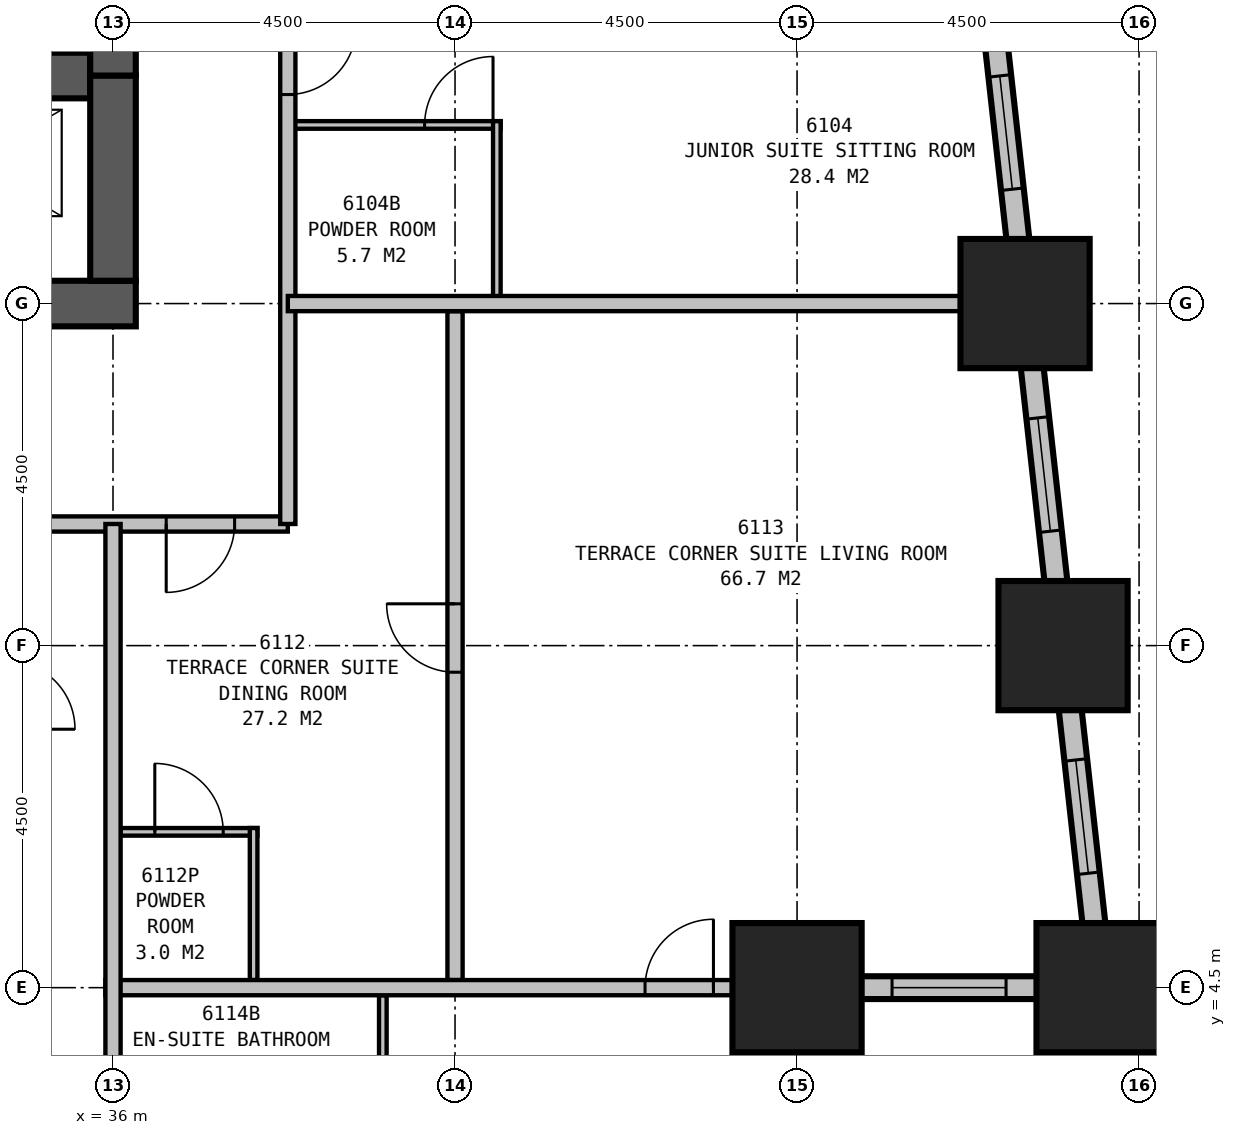
"""IFC4 building model, lengths in metres.
Left out: names, types, materials, properties, quantities, classifications, styles, units other than length and angle.
Written with IfcOpenShell. Run it as: python <this file> out.ifc"""

import sys

from ifc_helpers import new_model, si_unit, direction, frame, frame_2d, origin, origin_2d, place, context, subcontext, project, spatial, rectangle, extrude, element, fill, save


model = new_model("IFC4")
c1 = context("Model", 3, precision=1e-05, world=origin(), true_north=direction((0.0, 1.0)))
c2 = subcontext(c1, "Body", "Model", "MODEL_VIEW")
j1 = project(units=[si_unit("LENGTHUNIT", "METRE"), si_unit("PLANEANGLEUNIT", "RADIAN")], contexts=[c1])
p1 = place(None, origin())
s1 = spatial("IfcSite", under=j1, at=p1, CompositionType="ELEMENT")
p2 = place(p1, origin())
s2 = spatial("IfcBuilding", under=s1, at=p2, CompositionType="ELEMENT")
p3 = place(p2, frame((0.0, 0.0, 236.9)))
s3 = spatial("IfcBuildingStorey", under=s2, at=p3, CompositionType="ELEMENT", Elevation=236.9)
for number, where, z_axis, x_axis in (
    (1, (45.0, 4.5, 0.0), (0.0, 0.0, 1.0), (1.0, 0.0, 0.0)),
    (2, (49.0, 4.5, 0.0), (0.0, 0.0, 1.0), (1.0, 0.0, 0.0)),
    (3, (48.5, 9.0, 0.0), (0.0, 0.0, 1.0), (1.0, 0.0, 0.0)),
    (4, (48.0, 13.5, 0.0), (0.0, 0.0, 1.0), (1.0, 0.0, 0.0)),
):
    element("IfcColumn", number, at=place(p3, frame(where, z_axis=z_axis, x_axis=x_axis)), inside=s3, PredefinedType="COLUMN", context=c2, shape_type="SweptSolid", body=[
        extrude(rectangle(XDim=1.7, YDim=1.7, at=origin_2d()), origin(), (0.0, 0.0, 1.0), 3.9),
    ])
p4 = place(p3, frame((13.2, 13.5, 0.0), z_axis=(0.0, 0.0, 1.0), x_axis=(1.0, 0.0, 0.0)))
e5 = element("IfcWall", 5, at=p4, inside=s3, PredefinedType="SHEAR", context=c2, shape_type="SweptSolid", body=[
    extrude(rectangle(XDim=23.1, YDim=0.6, at=frame_2d((11.55, 0.0))), origin(), (0.0, 0.0, 1.0), 3.9),
])
p5 = place(p3, frame((13.8, 16.5, 0.0), z_axis=(0.0, 0.0, 1.0), x_axis=(1.0, 0.0, 0.0)))
e6 = element("IfcWall", 6, at=p5, inside=s3, PredefinedType="SHEAR", context=c2, shape_type="SweptSolid", body=[
    extrude(rectangle(XDim=21.9, YDim=0.6, at=frame_2d((10.95, 0.0))), origin(), (0.0, 0.0, 1.0), 3.9),
])
p6 = place(p5, frame((5.75, 0.0, 0.0), z_axis=(0.0, 0.0, 1.0), x_axis=(-1.0, 0.0, 0.0)))
e7 = element("IfcOpeningElement", 7, at=p6, cuts=e6, PredefinedType="OPENING", context=c2, shape_type="SweptSolid", body=[
    extrude(rectangle(XDim=1.0, YDim=2.1, at=frame_2d((0.5, 1.05))), frame((0.0, 0.31, 0.0), z_axis=(0.0, -1.0, 0.0), x_axis=(1.0, 0.0, 0.0)), (0.0, 0.0, 1.0), 0.62),
])
p7 = place(p5, frame((10.2, 0.0, 0.0), z_axis=(0.0, 0.0, 1.0), x_axis=(-1.0, 0.0, 0.0)))
e8 = element("IfcOpeningElement", 8, at=p7, cuts=e6, PredefinedType="OPENING", context=c2, shape_type="SweptSolid", body=[
    extrude(rectangle(XDim=1.0, YDim=2.1, at=frame_2d((0.5, 1.05))), frame((0.0, 0.31, 0.0), z_axis=(0.0, -1.0, 0.0), x_axis=(1.0, 0.0, 0.0)), (0.0, 0.0, 1.0), 0.62),
])
p8 = place(p5, frame((12.7, 0.0, 0.0), z_axis=(0.0, 0.0, 1.0), x_axis=(-1.0, 0.0, 0.0)))
e9 = element("IfcOpeningElement", 9, at=p8, cuts=e6, PredefinedType="OPENING", context=c2, shape_type="SweptSolid", body=[
    extrude(rectangle(XDim=1.0, YDim=2.1, at=frame_2d((0.5, 1.05))), frame((0.0, 0.31, 0.0), z_axis=(0.0, -1.0, 0.0), x_axis=(1.0, 0.0, 0.0)), (0.0, 0.0, 1.0), 0.62),
])
p9 = place(p5, frame((17.15, 0.0, 0.0), z_axis=(0.0, 0.0, 1.0), x_axis=(-1.0, 0.0, 0.0)))
e10 = element("IfcOpeningElement", 10, at=p9, cuts=e6, PredefinedType="OPENING", context=c2, shape_type="SweptSolid", body=[
    extrude(rectangle(XDim=1.0, YDim=2.1, at=frame_2d((0.5, 1.05))), frame((0.0, 0.31, 0.0), z_axis=(0.0, -1.0, 0.0), x_axis=(1.0, 0.0, 0.0)), (0.0, 0.0, 1.0), 0.62),
])
p10 = place(p5, frame((0.6, 0.0, 0.0)))
e11 = element("IfcOpeningElement", 11, at=p10, cuts=e6, PredefinedType="OPENING", context=c2, shape_type="SweptSolid", body=[
    extrude(rectangle(XDim=1.2, YDim=2.1, at=frame_2d((0.6, 1.05))), frame((0.0, 0.31, 0.0), z_axis=(0.0, -1.0, 0.0), x_axis=(1.0, 0.0, 0.0)), (0.0, 0.0, 1.0), 0.62),
])
p11 = place(p5, frame((19.6, 0.0, 0.0)))
e12 = element("IfcOpeningElement", 12, at=p11, cuts=e6, PredefinedType="OPENING", context=c2, shape_type="SweptSolid", body=[
    extrude(rectangle(XDim=1.2, YDim=2.1, at=frame_2d((0.6, 1.05))), frame((0.0, 0.31, 0.0), z_axis=(0.0, -1.0, 0.0), x_axis=(1.0, 0.0, 0.0)), (0.0, 0.0, 1.0), 0.62),
])
p12 = place(p3, frame((36.0, 13.8, 0.0), z_axis=(0.0, 0.0, 1.0), x_axis=(0.0, 1.0, 0.0)))
e13 = element("IfcWall", 13, at=p12, inside=s3, PredefinedType="SHEAR", context=c2, shape_type="SweptSolid", body=[
    extrude(rectangle(XDim=2.7, YDim=0.6, at=frame_2d((1.35, 0.0))), origin(), (0.0, 0.0, 1.0), 3.9),
])
p13 = place(p3, frame((36.0, 16.5, 0.0), z_axis=(0.0, 0.0, 1.0), x_axis=(0.0, 1.0, 0.0)))
e14 = element("IfcWall", 14, at=p13, inside=s3, PredefinedType="SHEAR", context=c2, shape_type="SweptSolid", body=[
    extrude(rectangle(XDim=3.5, YDim=0.6, at=frame_2d((1.75, 0.0))), origin(), (0.0, 0.0, 1.0), 3.9),
])
p14 = place(p13, frame((0.65, 0.0, 0.0)))
e15 = element("IfcOpeningElement", 15, at=p14, cuts=e14, PredefinedType="OPENING", context=c2, shape_type="SweptSolid", body=[
    extrude(rectangle(XDim=1.2, YDim=2.1, at=frame_2d((0.6, 1.05))), frame((0.0, 0.31, 0.0), z_axis=(0.0, -1.0, 0.0), x_axis=(1.0, 0.0, 0.0)), (0.0, 0.0, 1.0), 0.62),
])
p15 = place(p3, frame((45.0, -0.15, 0.0), z_axis=(0.0, 0.0, 1.0), x_axis=(0.0, 1.0, 0.0)))
e16 = element("IfcWall", 16, at=p15, inside=s3, PredefinedType="STANDARD", context=c2, shape_type="SweptSolid", body=[
    extrude(rectangle(XDim=4.8, YDim=0.3, at=frame_2d((2.4, 0.0))), origin(), (0.0, 0.0, 1.0), 2.5),
])
p16 = place(p15, frame((1.2, 0.0, 0.5)))
e17 = element("IfcOpeningElement", 17, at=p16, cuts=e16, PredefinedType="OPENING", context=c2, shape_type="SweptSolid", body=[
    extrude(rectangle(XDim=2.4, YDim=1.85, at=frame_2d((1.2, 0.925))), frame((0.0, 0.16, 0.0), z_axis=(0.0, -1.0, 0.0), x_axis=(1.0, 0.0, 0.0)), (0.0, 0.0, 1.0), 0.32),
])
p17 = place(p3, frame((44.85, 4.5, 0.0), z_axis=(0.0, 0.0, 1.0), x_axis=(1.0, 0.0, 0.0)))
e18 = element("IfcWall", 18, at=p17, inside=s3, PredefinedType="STANDARD", context=c2, shape_type="SweptSolid", body=[
    extrude(rectangle(XDim=4.3, YDim=0.3, at=frame_2d((2.15, 0.0))), origin(), (0.0, 0.0, 1.0), 2.5),
])
p18 = place(p17, frame((1.4, 0.0, 0.5)))
e19 = element("IfcOpeningElement", 19, at=p18, cuts=e18, PredefinedType="OPENING", context=c2, shape_type="SweptSolid", body=[
    extrude(rectangle(XDim=1.5, YDim=1.85, at=frame_2d((0.75, 0.925))), frame((0.0, 0.16, 0.0), z_axis=(0.0, -1.0, 0.0), x_axis=(1.0, 0.0, 0.0)), (0.0, 0.0, 1.0), 0.32),
])
p19 = place(p3, frame((49.017, 4.351, 0.0), z_axis=(0.0, 0.0, 1.0), x_axis=(-0.110433201132, 0.993883548555, 0.0)))
e20 = element("IfcWall", 20, at=p19, inside=s3, PredefinedType="STANDARD", context=c2, shape_type="SweptSolid", body=[
    extrude(rectangle(XDim=31.994, YDim=0.3, at=frame_2d((15.997, 0.0))), origin(), (0.0, 0.0, 1.0), 2.5),
])
p20 = place(p19, frame((1.664, 0.0, 0.5)))
e21 = element("IfcOpeningElement", 21, at=p20, cuts=e20, PredefinedType="OPENING", context=c2, shape_type="SweptSolid", body=[
    extrude(rectangle(XDim=1.5, YDim=1.85, at=frame_2d((0.75, 0.925))), frame((0.0, 0.16, 0.0), z_axis=(0.0, -1.0, 0.0), x_axis=(1.0, 0.0, 0.0)), (0.0, 0.0, 1.0), 0.32),
])
p21 = place(p19, frame((6.192, 0.0, 0.5)))
e22 = element("IfcOpeningElement", 22, at=p21, cuts=e20, PredefinedType="OPENING", context=c2, shape_type="SweptSolid", body=[
    extrude(rectangle(XDim=1.5, YDim=1.85, at=frame_2d((0.75, 0.925))), frame((0.0, 0.16, 0.0), z_axis=(0.0, -1.0, 0.0), x_axis=(1.0, 0.0, 0.0)), (0.0, 0.0, 1.0), 0.32),
])
p22 = place(p19, frame((10.719, 0.0, 0.5)))
e23 = element("IfcOpeningElement", 23, at=p22, cuts=e20, PredefinedType="OPENING", context=c2, shape_type="SweptSolid", body=[
    extrude(rectangle(XDim=1.5, YDim=1.85, at=frame_2d((0.75, 0.925))), frame((0.0, 0.16, 0.0), z_axis=(0.0, -1.0, 0.0), x_axis=(1.0, 0.0, 0.0)), (0.0, 0.0, 1.0), 0.32),
])
p23 = place(p19, frame((15.247, 0.0, 0.5)))
e24 = element("IfcOpeningElement", 24, at=p23, cuts=e20, PredefinedType="OPENING", context=c2, shape_type="SweptSolid", body=[
    extrude(rectangle(XDim=1.5, YDim=1.85, at=frame_2d((0.75, 0.925))), frame((0.0, 0.16, 0.0), z_axis=(0.0, -1.0, 0.0), x_axis=(1.0, 0.0, 0.0)), (0.0, 0.0, 1.0), 0.32),
])
p24 = place(p19, frame((19.775, 0.0, 0.5)))
e25 = element("IfcOpeningElement", 25, at=p24, cuts=e20, PredefinedType="OPENING", context=c2, shape_type="SweptSolid", body=[
    extrude(rectangle(XDim=1.5, YDim=1.85, at=frame_2d((0.75, 0.925))), frame((0.0, 0.16, 0.0), z_axis=(0.0, -1.0, 0.0), x_axis=(1.0, 0.0, 0.0)), (0.0, 0.0, 1.0), 0.32),
])
p25 = place(p19, frame((24.302, 0.0, 0.5)))
e26 = element("IfcOpeningElement", 26, at=p25, cuts=e20, PredefinedType="OPENING", context=c2, shape_type="SweptSolid", body=[
    extrude(rectangle(XDim=1.5, YDim=1.85, at=frame_2d((0.75, 0.925))), frame((0.0, 0.16, 0.0), z_axis=(0.0, -1.0, 0.0), x_axis=(1.0, 0.0, 0.0)), (0.0, 0.0, 1.0), 0.32),
])
p26 = place(p19, frame((28.83, 0.0, 0.5)))
e27 = element("IfcOpeningElement", 27, at=p26, cuts=e20, PredefinedType="OPENING", context=c2, shape_type="SweptSolid", body=[
    extrude(rectangle(XDim=1.5, YDim=1.85, at=frame_2d((0.75, 0.925))), frame((0.0, 0.16, 0.0), z_axis=(0.0, -1.0, 0.0), x_axis=(1.0, 0.0, 0.0)), (0.0, 0.0, 1.0), 0.32),
])
p27 = place(p3, frame((26.9, 10.6, 0.0), z_axis=(0.0, 0.0, 1.0), x_axis=(1.0, 0.0, 0.0)))
e28 = element("IfcWall", 28, at=p27, inside=s3, PredefinedType="PARTITIONING", context=c2, shape_type="SweptSolid", body=[
    extrude(rectangle(XDim=11.4, YDim=0.2, at=frame_2d((5.7, 0.0))), origin(), (0.0, 0.0, 1.0), 3.65),
])
p28 = place(p27, frame((1.85, 0.0, 0.0), z_axis=(0.0, 0.0, 1.0), x_axis=(-1.0, 0.0, 0.0)))
e29 = element("IfcOpeningElement", 29, at=p28, cuts=e28, PredefinedType="OPENING", context=c2, shape_type="SweptSolid", body=[
    extrude(rectangle(XDim=0.9, YDim=2.1, at=frame_2d((0.45, 1.05))), frame((0.0, 0.11, 0.0), z_axis=(0.0, -1.0, 0.0), x_axis=(1.0, 0.0, 0.0)), (0.0, 0.0, 1.0), 0.22),
])
p29 = place(p27, frame((10.7, 0.0, 0.0), z_axis=(0.0, 0.0, 1.0), x_axis=(-1.0, 0.0, 0.0)))
e30 = element("IfcOpeningElement", 30, at=p29, cuts=e28, PredefinedType="OPENING", context=c2, shape_type="SweptSolid", body=[
    extrude(rectangle(XDim=0.9, YDim=2.1, at=frame_2d((0.45, 1.05))), frame((0.0, 0.11, 0.0), z_axis=(0.0, -1.0, 0.0), x_axis=(1.0, 0.0, 0.0)), (0.0, 0.0, 1.0), 0.22),
])
p30 = place(p3, frame((38.3, 10.6, 0.0), z_axis=(0.0, 0.0, 1.0), x_axis=(0.0, 1.0, 0.0)))
e31 = element("IfcWall", 31, at=p30, inside=s3, PredefinedType="PARTITIONING", context=c2, shape_type="SweptSolid", body=[
    extrude(rectangle(XDim=18.7, YDim=0.2, at=frame_2d((9.35, 0.0))), origin(), (0.0, 0.0, 1.0), 3.65),
])
p31 = place(p30, frame((6.55, 0.0, 0.0), z_axis=(0.0, 0.0, 1.0), x_axis=(-1.0, 0.0, 0.0)))
e32 = element("IfcOpeningElement", 32, at=p31, cuts=e31, PredefinedType="OPENING", context=c2, shape_type="SweptSolid", body=[
    extrude(rectangle(XDim=0.9, YDim=2.1, at=frame_2d((0.45, 1.05))), frame((0.0, 0.11, 0.0), z_axis=(0.0, -1.0, 0.0), x_axis=(1.0, 0.0, 0.0)), (0.0, 0.0, 1.0), 0.22),
])
p32 = place(p30, frame((16.1, 0.0, 0.0), z_axis=(0.0, 0.0, 1.0), x_axis=(-1.0, 0.0, 0.0)))
e33 = element("IfcOpeningElement", 33, at=p32, cuts=e31, PredefinedType="OPENING", context=c2, shape_type="SweptSolid", body=[
    extrude(rectangle(XDim=1.0, YDim=2.1, at=frame_2d((0.5, 1.05))), frame((0.0, 0.11, 0.0), z_axis=(0.0, -1.0, 0.0), x_axis=(1.0, 0.0, 0.0)), (0.0, 0.0, 1.0), 0.22),
])
p33 = place(p3, frame((41.05, 13.5, 0.0), z_axis=(0.0, 0.0, 1.0), x_axis=(0.0, 1.0, 0.0)))
e34 = element("IfcWall", 34, at=p33, inside=s3, PredefinedType="PLUMBINGWALL", context=c2, shape_type="SweptSolid", body=[
    extrude(rectangle(XDim=2.4, YDim=0.1, at=frame_2d((1.2, 0.0))), origin(), (0.0, 0.0, 1.0), 3.65),
])
p34 = place(p3, frame((38.3, 15.85, 0.0), z_axis=(0.0, 0.0, 1.0), x_axis=(1.0, 0.0, 0.0)))
e35 = element("IfcWall", 35, at=p34, inside=s3, PredefinedType="PLUMBINGWALL", context=c2, shape_type="SweptSolid", body=[
    extrude(rectangle(XDim=2.8, YDim=0.1, at=frame_2d((1.4, 0.0))), origin(), (0.0, 0.0, 1.0), 3.65),
])
p35 = place(p34, frame((1.8, 0.0, 0.0)))
e36 = element("IfcOpeningElement", 36, at=p35, cuts=e35, PredefinedType="OPENING", context=c2, shape_type="SweptSolid", body=[
    extrude(rectangle(XDim=0.9, YDim=2.1, at=frame_2d((0.45, 1.05))), frame((0.0, 0.06, 0.0), z_axis=(0.0, -1.0, 0.0), x_axis=(1.0, 0.0, 0.0)), (0.0, 0.0, 1.0), 0.12),
])
p36 = place(p3, frame((38.3, 13.5, 0.0), z_axis=(0.0, 0.0, 1.0), x_axis=(1.0, 0.0, 0.0)))
e37 = element("IfcWall", 37, at=p36, inside=s3, PredefinedType="PARTITIONING", context=c2, shape_type="SweptSolid", body=[
    extrude(rectangle(XDim=9.921, YDim=0.2, at=frame_2d((4.96, 0.0))), origin(), (0.0, 0.0, 1.0), 2.35),
])
p37 = place(p3, frame((36.0, 10.6, 0.0), z_axis=(0.0, 0.0, 1.0), x_axis=(0.0, -1.0, 0.0)))
e38 = element("IfcWall", 38, at=p37, inside=s3, PredefinedType="PARTITIONING", context=c2, shape_type="SweptSolid", body=[
    extrude(rectangle(XDim=10.6, YDim=0.2, at=frame_2d((5.3, 0.0))), origin(), (0.0, 0.0, 1.0), 2.65),
])
p38 = place(p3, frame((35.9, 4.5, 0.0), z_axis=(0.0, 0.0, 1.0), x_axis=(1.0, 0.0, 0.0)))
e39 = element("IfcWall", 39, at=p38, inside=s3, PredefinedType="PARTITIONING", context=c2, shape_type="SweptSolid", body=[
    extrude(rectangle(XDim=9.1, YDim=0.2, at=frame_2d((4.55, 0.0))), origin(), (0.0, 0.0, 1.0), 3.65),
])
p39 = place(p38, frame((7.1, 0.0, 0.0)))
e40 = element("IfcOpeningElement", 40, at=p39, cuts=e39, PredefinedType="OPENING", context=c2, shape_type="SweptSolid", body=[
    extrude(rectangle(XDim=0.9, YDim=2.1, at=frame_2d((0.45, 1.05))), frame((0.0, 0.11, 0.0), z_axis=(0.0, -1.0, 0.0), x_axis=(1.0, 0.0, 0.0)), (0.0, 0.0, 1.0), 0.22),
])
p40 = place(p3, frame((40.5, 4.6, 0.0), z_axis=(0.0, 0.0, 1.0), x_axis=(0.0, 1.0, 0.0)))
e41 = element("IfcWall", 41, at=p40, inside=s3, PredefinedType="PARTITIONING", context=c2, shape_type="SweptSolid", body=[
    extrude(rectangle(XDim=8.8, YDim=0.2, at=frame_2d((4.4, 0.0))), origin(), (0.0, 0.0, 1.0), 2.65),
])
p41 = place(p40, frame((4.05, 0.0, 0.0)))
e42 = element("IfcOpeningElement", 42, at=p41, cuts=e41, PredefinedType="OPENING", context=c2, shape_type="SweptSolid", body=[
    extrude(rectangle(XDim=0.9, YDim=2.1, at=frame_2d((0.45, 1.05))), frame((0.0, 0.11, 0.0), z_axis=(0.0, -1.0, 0.0), x_axis=(1.0, 0.0, 0.0)), (0.0, 0.0, 1.0), 0.22),
])
p42 = place(p3, frame((37.85, 4.6, 0.0), z_axis=(0.0, 0.0, 1.0), x_axis=(0.0, 1.0, 0.0)))
e43 = element("IfcWall", 43, at=p42, inside=s3, PredefinedType="PLUMBINGWALL", context=c2, shape_type="SweptSolid", body=[
    extrude(rectangle(XDim=2.0, YDim=0.1, at=frame_2d((1.0, 0.0))), origin(), (0.0, 0.0, 1.0), 3.65),
])
p43 = place(p3, frame((36.1, 6.55, 0.0), z_axis=(0.0, 0.0, 1.0), x_axis=(1.0, 0.0, 0.0)))
e44 = element("IfcWall", 44, at=p43, inside=s3, PredefinedType="PLUMBINGWALL", context=c2, shape_type="SweptSolid", body=[
    extrude(rectangle(XDim=1.8, YDim=0.1, at=frame_2d((0.9, 0.0))), origin(), (0.0, 0.0, 1.0), 3.65),
])
p44 = place(p43, frame((0.45, 0.0, 0.0)))
e45 = element("IfcOpeningElement", 45, at=p44, cuts=e44, PredefinedType="OPENING", context=c2, shape_type="SweptSolid", body=[
    extrude(rectangle(XDim=0.9, YDim=2.1, at=frame_2d((0.45, 1.05))), frame((0.0, 0.06, 0.0), z_axis=(0.0, -1.0, 0.0), x_axis=(1.0, 0.0, 0.0)), (0.0, 0.0, 1.0), 0.12),
])
p45 = place(p3, frame((39.55, 4.4, 0.0), z_axis=(0.0, 0.0, 1.0), x_axis=(0.0, -1.0, 0.0)))
e46 = element("IfcWall", 46, at=p45, inside=s3, PredefinedType="PLUMBINGWALL", context=c2, shape_type="SweptSolid", body=[
    extrude(rectangle(XDim=2.3, YDim=0.1, at=frame_2d((1.15, 0.0))), origin(), (0.0, 0.0, 1.0), 3.65),
])
p46 = place(p18, origin())
e47 = element("IfcWindow", 47, at=p46, inside=s3, PartitioningType="SINGLE_PANEL", PredefinedType="WINDOW", context=c2, shape_type="SweptSolid", body=[
    extrude(rectangle(XDim=1.5, YDim=1.85, at=frame_2d((0.75, 0.925))), frame((0.0, 0.03, 0.0), z_axis=(0.0, -1.0, 0.0), x_axis=(1.0, 0.0, 0.0)), (0.0, 0.0, 1.0), 0.06),
])
fill(e19, e47)
p47 = place(p20, origin())
e48 = element("IfcWindow", 48, at=p47, inside=s3, PartitioningType="SINGLE_PANEL", PredefinedType="WINDOW", context=c2, shape_type="SweptSolid", body=[
    extrude(rectangle(XDim=1.5, YDim=1.85, at=frame_2d((0.75, 0.925))), frame((0.0, 0.03, 0.0), z_axis=(0.0, -1.0, 0.0), x_axis=(1.0, 0.0, 0.0)), (0.0, 0.0, 1.0), 0.06),
])
fill(e21, e48)
p48 = place(p21, origin())
e49 = element("IfcWindow", 49, at=p48, inside=s3, PartitioningType="SINGLE_PANEL", PredefinedType="WINDOW", context=c2, shape_type="SweptSolid", body=[
    extrude(rectangle(XDim=1.5, YDim=1.85, at=frame_2d((0.75, 0.925))), frame((0.0, 0.03, 0.0), z_axis=(0.0, -1.0, 0.0), x_axis=(1.0, 0.0, 0.0)), (0.0, 0.0, 1.0), 0.06),
])
fill(e22, e49)
p49 = place(p22, origin())
e50 = element("IfcWindow", 50, at=p49, inside=s3, PartitioningType="SINGLE_PANEL", PredefinedType="WINDOW", context=c2, shape_type="SweptSolid", body=[
    extrude(rectangle(XDim=1.5, YDim=1.85, at=frame_2d((0.75, 0.925))), frame((0.0, 0.03, 0.0), z_axis=(0.0, -1.0, 0.0), x_axis=(1.0, 0.0, 0.0)), (0.0, 0.0, 1.0), 0.06),
])
fill(e23, e50)
p50 = place(p29, origin())
e51 = element("IfcDoor", 51, at=p50, inside=s3, OperationType="SINGLE_SWING_RIGHT", PredefinedType="DOOR", context=c2, shape_type="SweptSolid", body=[
    extrude(rectangle(XDim=0.9, YDim=2.1, at=frame_2d((0.45, 1.05))), frame((0.0, 0.025, 0.0), z_axis=(0.0, -1.0, 0.0), x_axis=(1.0, 0.0, 0.0)), (0.0, 0.0, 1.0), 0.05),
])
fill(e30, e51)
p51 = place(p31, origin())
e52 = element("IfcDoor", 52, at=p51, inside=s3, OperationType="SINGLE_SWING_LEFT", PredefinedType="DOOR", context=c2, shape_type="SweptSolid", body=[
    extrude(rectangle(XDim=0.9, YDim=2.1, at=frame_2d((0.45, 1.05))), frame((0.0, 0.025, 0.0), z_axis=(0.0, -1.0, 0.0), x_axis=(1.0, 0.0, 0.0)), (0.0, 0.0, 1.0), 0.05),
])
fill(e32, e52)
p52 = place(p35, origin())
e53 = element("IfcDoor", 53, at=p52, inside=s3, OperationType="SINGLE_SWING_RIGHT", PredefinedType="DOOR", context=c2, shape_type="SweptSolid", body=[
    extrude(rectangle(XDim=0.9, YDim=2.1, at=frame_2d((0.45, 1.05))), frame((0.0, 0.025, 0.0), z_axis=(0.0, -1.0, 0.0), x_axis=(1.0, 0.0, 0.0)), (0.0, 0.0, 1.0), 0.05),
])
fill(e36, e53)
p53 = place(p39, origin())
e54 = element("IfcDoor", 54, at=p53, inside=s3, OperationType="SINGLE_SWING_RIGHT", PredefinedType="DOOR", context=c2, shape_type="SweptSolid", body=[
    extrude(rectangle(XDim=0.9, YDim=2.1, at=frame_2d((0.45, 1.05))), frame((0.0, 0.025, 0.0), z_axis=(0.0, -1.0, 0.0), x_axis=(1.0, 0.0, 0.0)), (0.0, 0.0, 1.0), 0.05),
])
fill(e40, e54)
p54 = place(p41, origin())
e55 = element("IfcDoor", 55, at=p54, inside=s3, OperationType="SINGLE_SWING_RIGHT", PredefinedType="DOOR", context=c2, shape_type="SweptSolid", body=[
    extrude(rectangle(XDim=0.9, YDim=2.1, at=frame_2d((0.45, 1.05))), frame((0.0, 0.025, 0.0), z_axis=(0.0, -1.0, 0.0), x_axis=(1.0, 0.0, 0.0)), (0.0, 0.0, 1.0), 0.05),
])
fill(e42, e55)
p55 = place(p44, origin())
e56 = element("IfcDoor", 56, at=p55, inside=s3, OperationType="SINGLE_SWING_LEFT", PredefinedType="DOOR", context=c2, shape_type="SweptSolid", body=[
    extrude(rectangle(XDim=0.9, YDim=2.1, at=frame_2d((0.45, 1.05))), frame((0.0, 0.025, 0.0), z_axis=(0.0, -1.0, 0.0), x_axis=(1.0, 0.0, 0.0)), (0.0, 0.0, 1.0), 0.05),
])
fill(e45, e56)
save(model, sys.argv[1])
